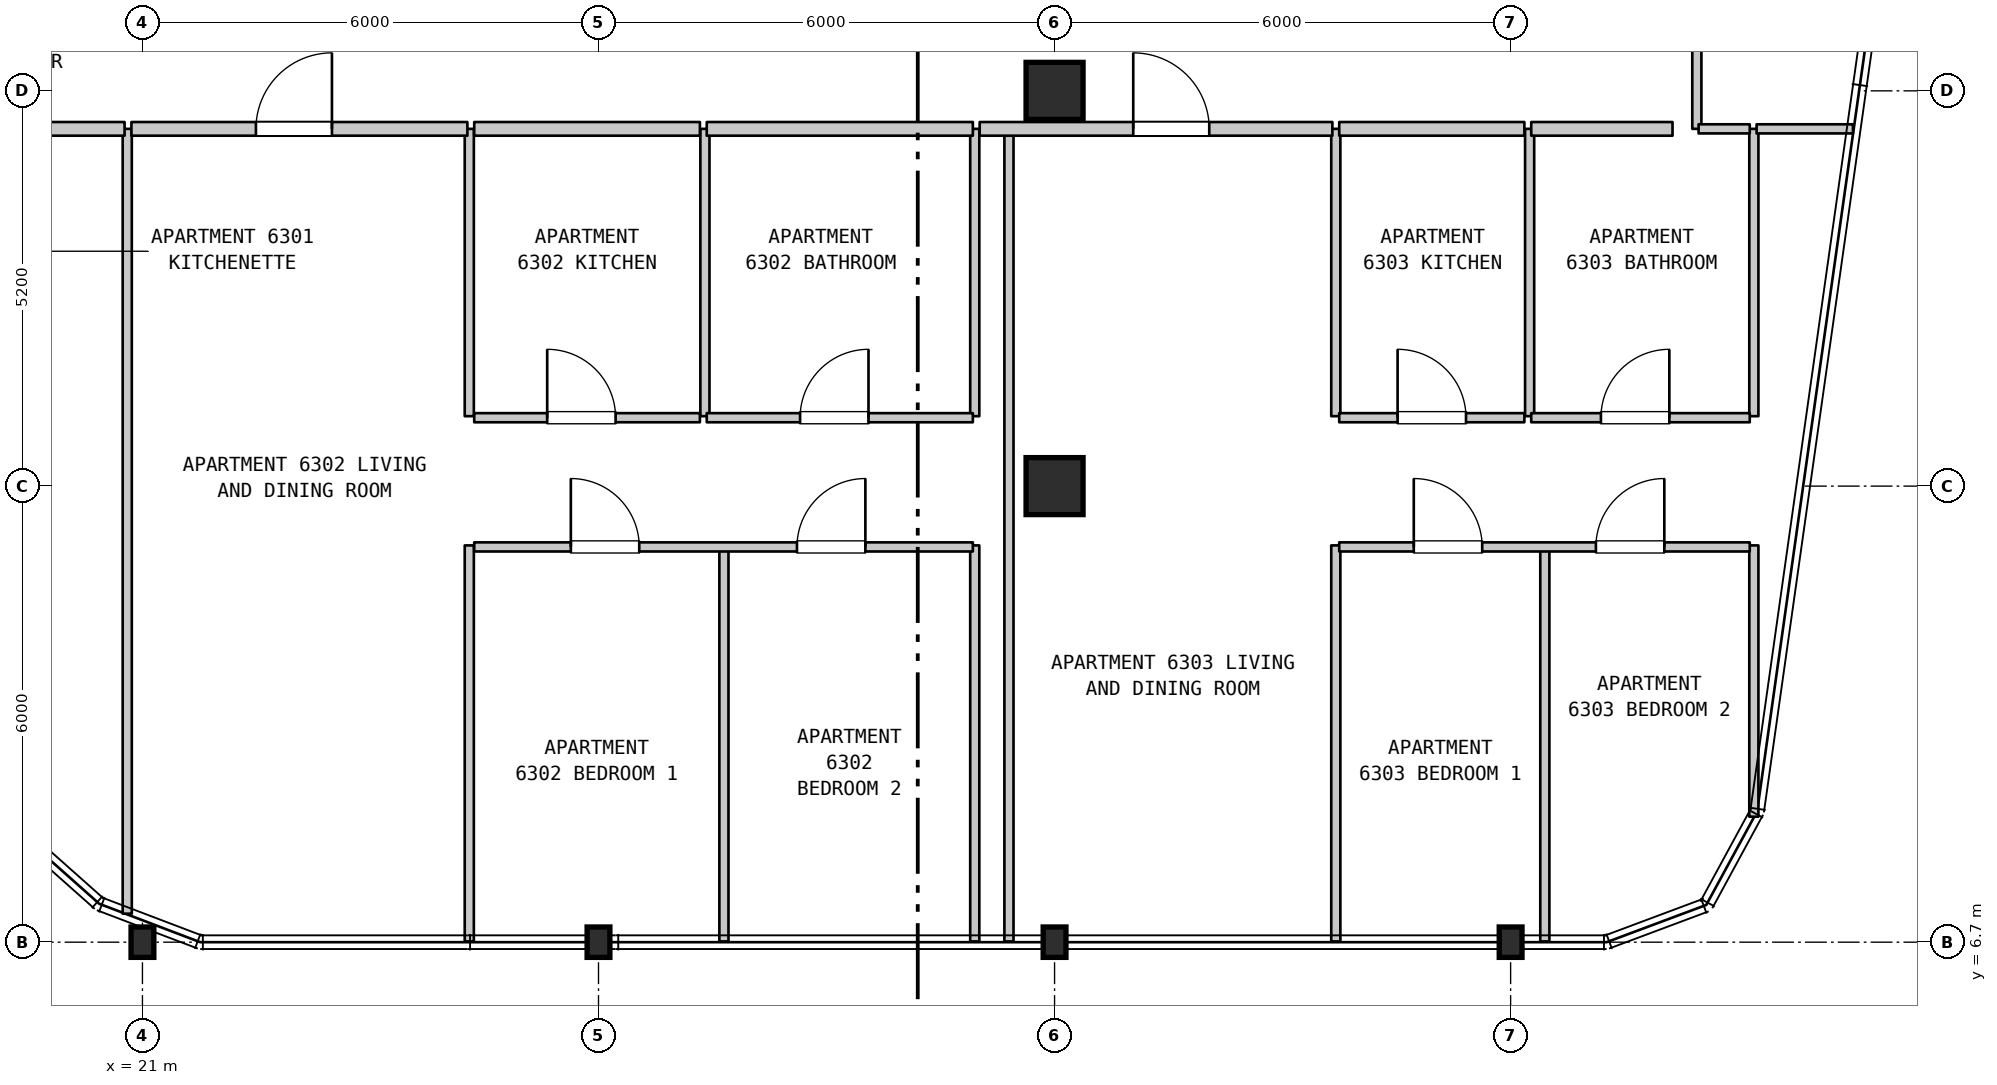
"""IFC4 building model, lengths in metres.
Left out: names, types, materials, properties, quantities, classifications, styles, units other than length and angle.
Written with IfcOpenShell. Run it as: python <this file> out.ifc"""

import sys

from ifc_helpers import new_model, si_unit, direction, frame, frame_2d, origin, origin_2d, place, context, subcontext, project, spatial, rectangle, i_section, extrude, element, fill, save


model = new_model("IFC4")
c1 = context("Model", 3, precision=1e-05, world=origin(), true_north=direction((0.0, 1.0)))
c2 = subcontext(c1, "Body", "Model", "MODEL_VIEW")
j1 = project(units=[si_unit("LENGTHUNIT", "METRE"), si_unit("PLANEANGLEUNIT", "RADIAN")], contexts=[c1])
p1 = place(None, origin())
s1 = spatial("IfcSite", under=j1, at=p1, CompositionType="ELEMENT")
p2 = place(p1, origin())
s2 = spatial("IfcBuilding", under=s1, at=p2, CompositionType="ELEMENT")
p3 = place(p2, frame((0.0, 0.0, 254.7)))
s3 = spatial("IfcBuildingStorey", under=s2, at=p3, CompositionType="ELEMENT", Elevation=254.7)
for number, where, z_axis, x_axis in (
    (1, (21.0, 6.7, 0.0), (0.0, 0.0, 1.0), (1.0, 0.0, 0.0)),
    (2, (27.0, 6.7, 0.0), (0.0, 0.0, 1.0), (1.0, 0.0, 0.0)),
    (3, (33.0, 6.7, 0.0), (0.0, 0.0, 1.0), (1.0, 0.0, 0.0)),
):
    element("IfcColumn", number, at=place(p3, frame(where, z_axis=z_axis, x_axis=x_axis)), inside=s3, PredefinedType="COLUMN", context=c2, shape_type="SweptSolid", body=[
        extrude(i_section(OverallWidth=0.3, OverallDepth=0.4, WebThickness=0.013, FlangeThickness=0.024, FilletRadius=0.027, at=origin_2d()), origin(), (0.0, 0.0, 1.0), 3.7),
    ])
for number, where, z_axis, x_axis in (
    (4, (33.0, 12.7, 0.0), (0.0, 0.0, 1.0), (1.0, 0.0, 0.0)),
    (5, (33.0, 17.9, 0.0), (0.0, 0.0, 1.0), (1.0, 0.0, 0.0)),
):
    element("IfcColumn", number, at=place(p3, frame(where, z_axis=z_axis, x_axis=x_axis)), inside=s3, PredefinedType="COLUMN", context=c2, shape_type="SweptSolid", body=[
        extrude(rectangle(XDim=0.75, YDim=0.75, at=origin_2d()), origin(), (0.0, 0.0, 1.0), 3.7),
    ])
p4 = place(p3, frame((39.0, 6.7, 0.0), z_axis=(0.0, 0.0, 1.0), x_axis=(1.0, 0.0, 0.0)))
e6 = element("IfcColumn", 6, at=p4, inside=s3, PredefinedType="COLUMN", context=c2, shape_type="SweptSolid", body=[
    extrude(i_section(OverallWidth=0.3, OverallDepth=0.4, WebThickness=0.013, FlangeThickness=0.024, FilletRadius=0.027, at=origin_2d()), origin(), (0.0, 0.0, 1.0), 3.7),
])
p5 = place(p3, frame((20.8, 7.075, 0.0), z_axis=(0.0, 0.0, 1.0), x_axis=(0.0, 1.0, 0.0)))
e7 = element("IfcWall", 7, at=p5, inside=s3, PredefinedType="PARTITIONING", context=c2, shape_type="SweptSolid", body=[
    extrude(rectangle(XDim=10.325, YDim=0.12, at=frame_2d((5.163, 0.0))), origin(), (0.0, 0.0, 1.0), 3.39),
])
p6 = place(p3, frame((25.3, 6.71, 0.0), z_axis=(0.0, 0.0, 1.0), x_axis=(0.0, 1.0, 0.0)))
e8 = element("IfcWall", 8, at=p6, inside=s3, PredefinedType="PARTITIONING", context=c2, shape_type="SweptSolid", body=[
    extrude(rectangle(XDim=5.21, YDim=0.12, at=frame_2d((2.605, 0.0))), origin(), (0.0, 0.0, 1.0), 3.39),
])
for number, where, z_axis, x_axis in (
    (9, (25.3, 13.62, 0.0), (0.0, 0.0, 1.0), (0.0, 1.0, 0.0)),
    (10, (28.4, 13.62, 0.0), (0.0, 0.0, 1.0), (0.0, 1.0, 0.0)),
):
    element("IfcWall", number, at=place(p3, frame(where, z_axis=z_axis, x_axis=x_axis)), inside=s3, PredefinedType="PARTITIONING", context=c2, shape_type="SweptSolid", body=[
        extrude(rectangle(XDim=3.78, YDim=0.12, at=frame_2d((1.89, 0.0))), origin(), (0.0, 0.0, 1.0), 3.39),
    ])
for number, where, z_axis, x_axis in (
    (11, (28.65, 6.71, 0.0), (0.0, 0.0, 1.0), (0.0, 1.0, 0.0)),
    (12, (31.95, 6.71, 0.0), (0.0, 0.0, 1.0), (0.0, 1.0, 0.0)),
):
    element("IfcWall", number, at=place(p3, frame(where, z_axis=z_axis, x_axis=x_axis)), inside=s3, PredefinedType="PARTITIONING", context=c2, shape_type="SweptSolid", body=[
        extrude(rectangle(XDim=5.21, YDim=0.12, at=frame_2d((2.605, 0.0))), origin(), (0.0, 0.0, 1.0), 3.39),
    ])
p7 = place(p3, frame((31.95, 13.62, 0.0), z_axis=(0.0, 0.0, 1.0), x_axis=(0.0, 1.0, 0.0)))
e13 = element("IfcWall", 13, at=p7, inside=s3, PredefinedType="PARTITIONING", context=c2, shape_type="SweptSolid", body=[
    extrude(rectangle(XDim=3.78, YDim=0.12, at=frame_2d((1.89, 0.0))), origin(), (0.0, 0.0, 1.0), 3.39),
])
p8 = place(p3, frame((32.4, 6.71, 0.0), z_axis=(0.0, 0.0, 1.0), x_axis=(0.0, 1.0, 0.0)))
e14 = element("IfcWall", 14, at=p8, inside=s3, PredefinedType="PARTITIONING", context=c2, shape_type="SweptSolid", body=[
    extrude(rectangle(XDim=10.69, YDim=0.12, at=frame_2d((5.345, 0.0))), origin(), (0.0, 0.0, 1.0), 3.39),
])
p9 = place(p3, frame((36.7, 6.71, 0.0), z_axis=(0.0, 0.0, 1.0), x_axis=(0.0, 1.0, 0.0)))
e15 = element("IfcWall", 15, at=p9, inside=s3, PredefinedType="PARTITIONING", context=c2, shape_type="SweptSolid", body=[
    extrude(rectangle(XDim=5.21, YDim=0.12, at=frame_2d((2.605, 0.0))), origin(), (0.0, 0.0, 1.0), 3.39),
])
for number, where, z_axis, x_axis in (
    (16, (36.7, 13.62, 0.0), (0.0, 0.0, 1.0), (0.0, 1.0, 0.0)),
    (17, (39.25, 13.62, 0.0), (0.0, 0.0, 1.0), (0.0, 1.0, 0.0)),
):
    element("IfcWall", number, at=place(p3, frame(where, z_axis=z_axis, x_axis=x_axis)), inside=s3, PredefinedType="PARTITIONING", context=c2, shape_type="SweptSolid", body=[
        extrude(rectangle(XDim=3.78, YDim=0.12, at=frame_2d((1.89, 0.0))), origin(), (0.0, 0.0, 1.0), 3.39),
    ])
p10 = place(p3, frame((39.45, 6.71, 0.0), z_axis=(0.0, 0.0, 1.0), x_axis=(0.0, 1.0, 0.0)))
e18 = element("IfcWall", 18, at=p10, inside=s3, PredefinedType="PARTITIONING", context=c2, shape_type="SweptSolid", body=[
    extrude(rectangle(XDim=5.21, YDim=0.12, at=frame_2d((2.605, 0.0))), origin(), (0.0, 0.0, 1.0), 3.39),
])
p11 = place(p3, frame((41.45, 17.4, 0.0), z_axis=(0.0, 0.0, 1.0), x_axis=(0.0, 1.0, 0.0)))
e19 = element("IfcWall", 19, at=p11, inside=s3, PredefinedType="PARTITIONING", context=c2, shape_type="SweptSolid", body=[
    extrude(rectangle(XDim=2.099, YDim=0.12, at=frame_2d((1.05, 0.0))), origin(), (0.0, 0.0, 1.0), 3.39),
])
p12 = place(p3, frame((42.2, 8.351, 0.0), z_axis=(0.0, 0.0, 1.0), x_axis=(0.0, 1.0, 0.0)))
e20 = element("IfcWall", 20, at=p12, inside=s3, PredefinedType="PARTITIONING", context=c2, shape_type="SweptSolid", body=[
    extrude(rectangle(XDim=3.569, YDim=0.12, at=frame_2d((1.784, 0.0))), origin(), (0.0, 0.0, 1.0), 3.39),
])
p13 = place(p3, frame((42.2, 13.62, 0.0), z_axis=(0.0, 0.0, 1.0), x_axis=(0.0, 1.0, 0.0)))
e21 = element("IfcWall", 21, at=p13, inside=s3, PredefinedType="PARTITIONING", context=c2, shape_type="SweptSolid", body=[
    extrude(rectangle(XDim=3.78, YDim=0.12, at=frame_2d((1.89, 0.0))), origin(), (0.0, 0.0, 1.0), 3.39),
])
p14 = place(p3, frame((25.365, 11.9, 0.0), z_axis=(0.0, 0.0, 1.0), x_axis=(1.0, 0.0, 0.0)))
e22 = element("IfcWall", 22, at=p14, inside=s3, PredefinedType="PARTITIONING", context=c2, shape_type="SweptSolid", body=[
    extrude(rectangle(XDim=6.56, YDim=0.12, at=frame_2d((3.28, 0.0))), origin(), (0.0, 0.0, 1.0), 3.39),
])
p15 = place(p14, frame((1.271, 0.0, 0.0)))
e23 = element("IfcOpeningElement", 23, at=p15, cuts=e22, PredefinedType="OPENING", context=c2, shape_type="SweptSolid", body=[
    extrude(rectangle(XDim=0.9, YDim=2.15, at=frame_2d((0.45, 1.075))), frame((0.0, 0.07, 0.0), z_axis=(0.0, -1.0, 0.0), x_axis=(1.0, 0.0, 0.0)), (0.0, 0.0, 1.0), 0.14),
])
p16 = place(p14, frame((4.246, 0.0, 0.0)))
e24 = element("IfcOpeningElement", 24, at=p16, cuts=e22, PredefinedType="OPENING", context=c2, shape_type="SweptSolid", body=[
    extrude(rectangle(XDim=0.9, YDim=2.15, at=frame_2d((0.45, 1.075))), frame((0.0, 0.07, 0.0), z_axis=(0.0, -1.0, 0.0), x_axis=(1.0, 0.0, 0.0)), (0.0, 0.0, 1.0), 0.14),
])
p17 = place(p3, frame((36.745, 11.9, 0.0), z_axis=(0.0, 0.0, 1.0), x_axis=(1.0, 0.0, 0.0)))
e25 = element("IfcWall", 25, at=p17, inside=s3, PredefinedType="PARTITIONING", context=c2, shape_type="SweptSolid", body=[
    extrude(rectangle(XDim=5.401, YDim=0.12, at=frame_2d((2.7, 0.0))), origin(), (0.0, 0.0, 1.0), 3.39),
])
p18 = place(p17, frame((0.981, 0.0, 0.0)))
e26 = element("IfcOpeningElement", 26, at=p18, cuts=e25, PredefinedType="OPENING", context=c2, shape_type="SweptSolid", body=[
    extrude(rectangle(XDim=0.9, YDim=2.15, at=frame_2d((0.45, 1.075))), frame((0.0, 0.07, 0.0), z_axis=(0.0, -1.0, 0.0), x_axis=(1.0, 0.0, 0.0)), (0.0, 0.0, 1.0), 0.14),
])
p19 = place(p17, frame((3.377, 0.0, 0.0)))
e27 = element("IfcOpeningElement", 27, at=p19, cuts=e25, PredefinedType="OPENING", context=c2, shape_type="SweptSolid", body=[
    extrude(rectangle(XDim=0.9, YDim=2.15, at=frame_2d((0.45, 1.075))), frame((0.0, 0.07, 0.0), z_axis=(0.0, -1.0, 0.0), x_axis=(1.0, 0.0, 0.0)), (0.0, 0.0, 1.0), 0.14),
])
p20 = place(p3, frame((25.365, 13.6, 0.0), z_axis=(0.0, 0.0, 1.0), x_axis=(1.0, 0.0, 0.0)))
e28 = element("IfcWall", 28, at=p20, inside=s3, PredefinedType="PARTITIONING", context=c2, shape_type="SweptSolid", body=[
    extrude(rectangle(XDim=2.969, YDim=0.12, at=frame_2d((1.484, 0.0))), origin(), (0.0, 0.0, 1.0), 3.39),
])
p21 = place(p20, frame((0.96, 0.0, 0.0)))
e29 = element("IfcOpeningElement", 29, at=p21, cuts=e28, PredefinedType="OPENING", context=c2, shape_type="SweptSolid", body=[
    extrude(rectangle(XDim=0.9, YDim=2.15, at=frame_2d((0.45, 1.075))), frame((0.0, 0.07, 0.0), z_axis=(0.0, -1.0, 0.0), x_axis=(1.0, 0.0, 0.0)), (0.0, 0.0, 1.0), 0.14),
])
p22 = place(p3, frame((28.424, 13.6, 0.0), z_axis=(0.0, 0.0, 1.0), x_axis=(1.0, 0.0, 0.0)))
e30 = element("IfcWall", 30, at=p22, inside=s3, PredefinedType="PARTITIONING", context=c2, shape_type="SweptSolid", body=[
    extrude(rectangle(XDim=3.501, YDim=0.12, at=frame_2d((1.75, 0.0))), origin(), (0.0, 0.0, 1.0), 3.39),
])
p23 = place(p22, frame((1.228, 0.0, 0.0)))
e31 = element("IfcOpeningElement", 31, at=p23, cuts=e30, PredefinedType="OPENING", context=c2, shape_type="SweptSolid", body=[
    extrude(rectangle(XDim=0.9, YDim=2.1, at=frame_2d((0.45, 1.05))), frame((0.0, 0.07, 0.0), z_axis=(0.0, -1.0, 0.0), x_axis=(1.0, 0.0, 0.0)), (0.0, 0.0, 1.0), 0.14),
])
p24 = place(p3, frame((36.745, 13.6, 0.0), z_axis=(0.0, 0.0, 1.0), x_axis=(1.0, 0.0, 0.0)))
e32 = element("IfcWall", 32, at=p24, inside=s3, PredefinedType="PARTITIONING", context=c2, shape_type="SweptSolid", body=[
    extrude(rectangle(XDim=2.436, YDim=0.12, at=frame_2d((1.218, 0.0))), origin(), (0.0, 0.0, 1.0), 3.39),
])
p25 = place(p24, frame((0.768, 0.0, 0.0)))
e33 = element("IfcOpeningElement", 33, at=p25, cuts=e32, PredefinedType="OPENING", context=c2, shape_type="SweptSolid", body=[
    extrude(rectangle(XDim=0.9, YDim=2.15, at=frame_2d((0.45, 1.075))), frame((0.0, 0.07, 0.0), z_axis=(0.0, -1.0, 0.0), x_axis=(1.0, 0.0, 0.0)), (0.0, 0.0, 1.0), 0.14),
])
p26 = place(p3, frame((39.271, 13.6, 0.0), z_axis=(0.0, 0.0, 1.0), x_axis=(1.0, 0.0, 0.0)))
e34 = element("IfcWall", 34, at=p26, inside=s3, PredefinedType="PARTITIONING", context=c2, shape_type="SweptSolid", body=[
    extrude(rectangle(XDim=2.875, YDim=0.12, at=frame_2d((1.438, 0.0))), origin(), (0.0, 0.0, 1.0), 3.39),
])
p27 = place(p26, frame((0.917, 0.0, 0.0)))
e35 = element("IfcOpeningElement", 35, at=p27, cuts=e34, PredefinedType="OPENING", context=c2, shape_type="SweptSolid", body=[
    extrude(rectangle(XDim=0.9, YDim=2.1, at=frame_2d((0.45, 1.05))), frame((0.0, 0.07, 0.0), z_axis=(0.0, -1.0, 0.0), x_axis=(1.0, 0.0, 0.0)), (0.0, 0.0, 1.0), 0.14),
])
p28 = place(p3, frame((18.905, 17.4, 0.0), z_axis=(0.0, 0.0, 1.0), x_axis=(1.0, 0.0, 0.0)))
e36 = element("IfcWall", 36, at=p28, inside=s3, PredefinedType="STANDARD", context=c2, shape_type="SweptSolid", body=[
    extrude(rectangle(XDim=1.86, YDim=0.18, at=frame_2d((0.93, 0.0))), origin(), (0.0, 0.0, 1.0), 3.39),
])
p29 = place(p3, frame((20.855, 17.4, 0.0), z_axis=(0.0, 0.0, 1.0), x_axis=(1.0, 0.0, 0.0)))
e37 = element("IfcWall", 37, at=p29, inside=s3, PredefinedType="STANDARD", context=c2, shape_type="SweptSolid", body=[
    extrude(rectangle(XDim=4.42, YDim=0.18, at=frame_2d((2.21, 0.0))), origin(), (0.0, 0.0, 1.0), 3.39),
])
p30 = place(p29, frame((1.638, 0.0, 0.0)))
e38 = element("IfcOpeningElement", 38, at=p30, cuts=e37, PredefinedType="OPENING", context=c2, shape_type="SweptSolid", body=[
    extrude(rectangle(XDim=1.0, YDim=2.15, at=frame_2d((0.5, 1.075))), frame((0.0, 0.1, 0.0), z_axis=(0.0, -1.0, 0.0), x_axis=(1.0, 0.0, 0.0)), (0.0, 0.0, 1.0), 0.2),
])
p31 = place(p3, frame((25.365, 17.4, 0.0), z_axis=(0.0, 0.0, 1.0), x_axis=(1.0, 0.0, 0.0)))
e39 = element("IfcWall", 39, at=p31, inside=s3, PredefinedType="STANDARD", context=c2, shape_type="SweptSolid", body=[
    extrude(rectangle(XDim=2.969, YDim=0.18, at=frame_2d((1.484, 0.0))), origin(), (0.0, 0.0, 1.0), 3.39),
])
p32 = place(p3, frame((28.424, 17.4, 0.0), z_axis=(0.0, 0.0, 1.0), x_axis=(1.0, 0.0, 0.0)))
e40 = element("IfcWall", 40, at=p32, inside=s3, PredefinedType="STANDARD", context=c2, shape_type="SweptSolid", body=[
    extrude(rectangle(XDim=3.501, YDim=0.18, at=frame_2d((1.75, 0.0))), origin(), (0.0, 0.0, 1.0), 3.39),
])
p33 = place(p3, frame((32.015, 17.4, 0.0), z_axis=(0.0, 0.0, 1.0), x_axis=(1.0, 0.0, 0.0)))
e41 = element("IfcWall", 41, at=p33, inside=s3, PredefinedType="STANDARD", context=c2, shape_type="SweptSolid", body=[
    extrude(rectangle(XDim=4.64, YDim=0.18, at=frame_2d((2.32, 0.0))), origin(), (0.0, 0.0, 1.0), 3.39),
])
p34 = place(p33, frame((2.02, 0.0, 0.0)))
e42 = element("IfcOpeningElement", 42, at=p34, cuts=e41, PredefinedType="OPENING", context=c2, shape_type="SweptSolid", body=[
    extrude(rectangle(XDim=1.0, YDim=2.15, at=frame_2d((0.5, 1.075))), frame((0.0, 0.1, 0.0), z_axis=(0.0, -1.0, 0.0), x_axis=(1.0, 0.0, 0.0)), (0.0, 0.0, 1.0), 0.2),
])
p35 = place(p3, frame((36.745, 17.4, 0.0), z_axis=(0.0, 0.0, 1.0), x_axis=(1.0, 0.0, 0.0)))
e43 = element("IfcWall", 43, at=p35, inside=s3, PredefinedType="STANDARD", context=c2, shape_type="SweptSolid", body=[
    extrude(rectangle(XDim=2.436, YDim=0.18, at=frame_2d((1.218, 0.0))), origin(), (0.0, 0.0, 1.0), 3.39),
])
p36 = place(p3, frame((39.271, 17.4, 0.0), z_axis=(0.0, 0.0, 1.0), x_axis=(1.0, 0.0, 0.0)))
e44 = element("IfcWall", 44, at=p36, inside=s3, PredefinedType="STANDARD", context=c2, shape_type="SweptSolid", body=[
    extrude(rectangle(XDim=1.859, YDim=0.18, at=frame_2d((0.929, 0.0))), origin(), (0.0, 0.0, 1.0), 3.39),
])
p37 = place(p3, frame((41.473, 17.4, 0.0), z_axis=(0.0, 0.0, 1.0), x_axis=(1.0, 0.0, 0.0)))
e45 = element("IfcWall", 45, at=p37, inside=s3, PredefinedType="PARTITIONING", context=c2, shape_type="SweptSolid", body=[
    extrude(rectangle(XDim=0.673, YDim=0.12, at=frame_2d((0.336, 0.0))), origin(), (0.0, 0.0, 1.0), 3.39),
])
p38 = place(p3, frame((42.236, 17.4, 0.0), z_axis=(0.0, 0.0, 1.0), x_axis=(1.0, 0.0, 0.0)))
e46 = element("IfcWall", 46, at=p38, inside=s3, PredefinedType="PARTITIONING", context=c2, shape_type="SweptSolid", body=[
    extrude(rectangle(XDim=1.268, YDim=0.12, at=frame_2d((0.634, 0.0))), origin(), (0.0, 0.0, 1.0), 3.39),
])
p39 = place(p15, origin())
e47 = element("IfcDoor", 47, at=p39, inside=s3, OperationType="SINGLE_SWING_LEFT", PredefinedType="DOOR", context=c2, shape_type="SweptSolid", body=[
    extrude(rectangle(XDim=0.9, YDim=2.15, at=frame_2d((0.45, 1.075))), frame((0.0, 0.025, 0.0), z_axis=(0.0, -1.0, 0.0), x_axis=(1.0, 0.0, 0.0)), (0.0, 0.0, 1.0), 0.05),
])
fill(e23, e47)
p40 = place(p16, origin())
e48 = element("IfcDoor", 48, at=p40, inside=s3, OperationType="SINGLE_SWING_RIGHT", PredefinedType="DOOR", context=c2, shape_type="SweptSolid", body=[
    extrude(rectangle(XDim=0.9, YDim=2.15, at=frame_2d((0.45, 1.075))), frame((0.0, 0.025, 0.0), z_axis=(0.0, -1.0, 0.0), x_axis=(1.0, 0.0, 0.0)), (0.0, 0.0, 1.0), 0.05),
])
fill(e24, e48)
p41 = place(p18, origin())
e49 = element("IfcDoor", 49, at=p41, inside=s3, OperationType="SINGLE_SWING_LEFT", PredefinedType="DOOR", context=c2, shape_type="SweptSolid", body=[
    extrude(rectangle(XDim=0.9, YDim=2.15, at=frame_2d((0.45, 1.075))), frame((0.0, 0.025, 0.0), z_axis=(0.0, -1.0, 0.0), x_axis=(1.0, 0.0, 0.0)), (0.0, 0.0, 1.0), 0.05),
])
fill(e26, e49)
p42 = place(p19, origin())
e50 = element("IfcDoor", 50, at=p42, inside=s3, OperationType="SINGLE_SWING_RIGHT", PredefinedType="DOOR", context=c2, shape_type="SweptSolid", body=[
    extrude(rectangle(XDim=0.9, YDim=2.15, at=frame_2d((0.45, 1.075))), frame((0.0, 0.025, 0.0), z_axis=(0.0, -1.0, 0.0), x_axis=(1.0, 0.0, 0.0)), (0.0, 0.0, 1.0), 0.05),
])
fill(e27, e50)
p43 = place(p21, origin())
e51 = element("IfcDoor", 51, at=p43, inside=s3, OperationType="SINGLE_SWING_LEFT", PredefinedType="DOOR", context=c2, shape_type="SweptSolid", body=[
    extrude(rectangle(XDim=0.9, YDim=2.15, at=frame_2d((0.45, 1.075))), frame((0.0, 0.025, 0.0), z_axis=(0.0, -1.0, 0.0), x_axis=(1.0, 0.0, 0.0)), (0.0, 0.0, 1.0), 0.05),
])
fill(e29, e51)
p44 = place(p23, origin())
e52 = element("IfcDoor", 52, at=p44, inside=s3, OperationType="SINGLE_SWING_RIGHT", PredefinedType="DOOR", context=c2, shape_type="SweptSolid", body=[
    extrude(rectangle(XDim=0.9, YDim=2.1, at=frame_2d((0.45, 1.05))), frame((0.0, 0.025, 0.0), z_axis=(0.0, -1.0, 0.0), x_axis=(1.0, 0.0, 0.0)), (0.0, 0.0, 1.0), 0.05),
])
fill(e31, e52)
p45 = place(p25, origin())
e53 = element("IfcDoor", 53, at=p45, inside=s3, OperationType="SINGLE_SWING_LEFT", PredefinedType="DOOR", context=c2, shape_type="SweptSolid", body=[
    extrude(rectangle(XDim=0.9, YDim=2.15, at=frame_2d((0.45, 1.075))), frame((0.0, 0.025, 0.0), z_axis=(0.0, -1.0, 0.0), x_axis=(1.0, 0.0, 0.0)), (0.0, 0.0, 1.0), 0.05),
])
fill(e33, e53)
p46 = place(p27, origin())
e54 = element("IfcDoor", 54, at=p46, inside=s3, OperationType="SINGLE_SWING_RIGHT", PredefinedType="DOOR", context=c2, shape_type="SweptSolid", body=[
    extrude(rectangle(XDim=0.9, YDim=2.1, at=frame_2d((0.45, 1.05))), frame((0.0, 0.025, 0.0), z_axis=(0.0, -1.0, 0.0), x_axis=(1.0, 0.0, 0.0)), (0.0, 0.0, 1.0), 0.05),
])
fill(e35, e54)
p47 = place(p30, origin())
e55 = element("IfcDoor", 55, at=p47, inside=s3, OperationType="SINGLE_SWING_RIGHT", PredefinedType="DOOR", context=c2, shape_type="SweptSolid", body=[
    extrude(rectangle(XDim=1.0, YDim=2.15, at=frame_2d((0.5, 1.075))), frame((0.0, 0.025, 0.0), z_axis=(0.0, -1.0, 0.0), x_axis=(1.0, 0.0, 0.0)), (0.0, 0.0, 1.0), 0.05),
])
fill(e38, e55)
p48 = place(p34, origin())
e56 = element("IfcDoor", 56, at=p48, inside=s3, OperationType="SINGLE_SWING_LEFT", PredefinedType="DOOR", context=c2, shape_type="SweptSolid", body=[
    extrude(rectangle(XDim=1.0, YDim=2.15, at=frame_2d((0.5, 1.075))), frame((0.0, 0.025, 0.0), z_axis=(0.0, -1.0, 0.0), x_axis=(1.0, 0.0, 0.0)), (0.0, 0.0, 1.0), 0.05),
])
fill(e42, e56)
save(model, sys.argv[1])
